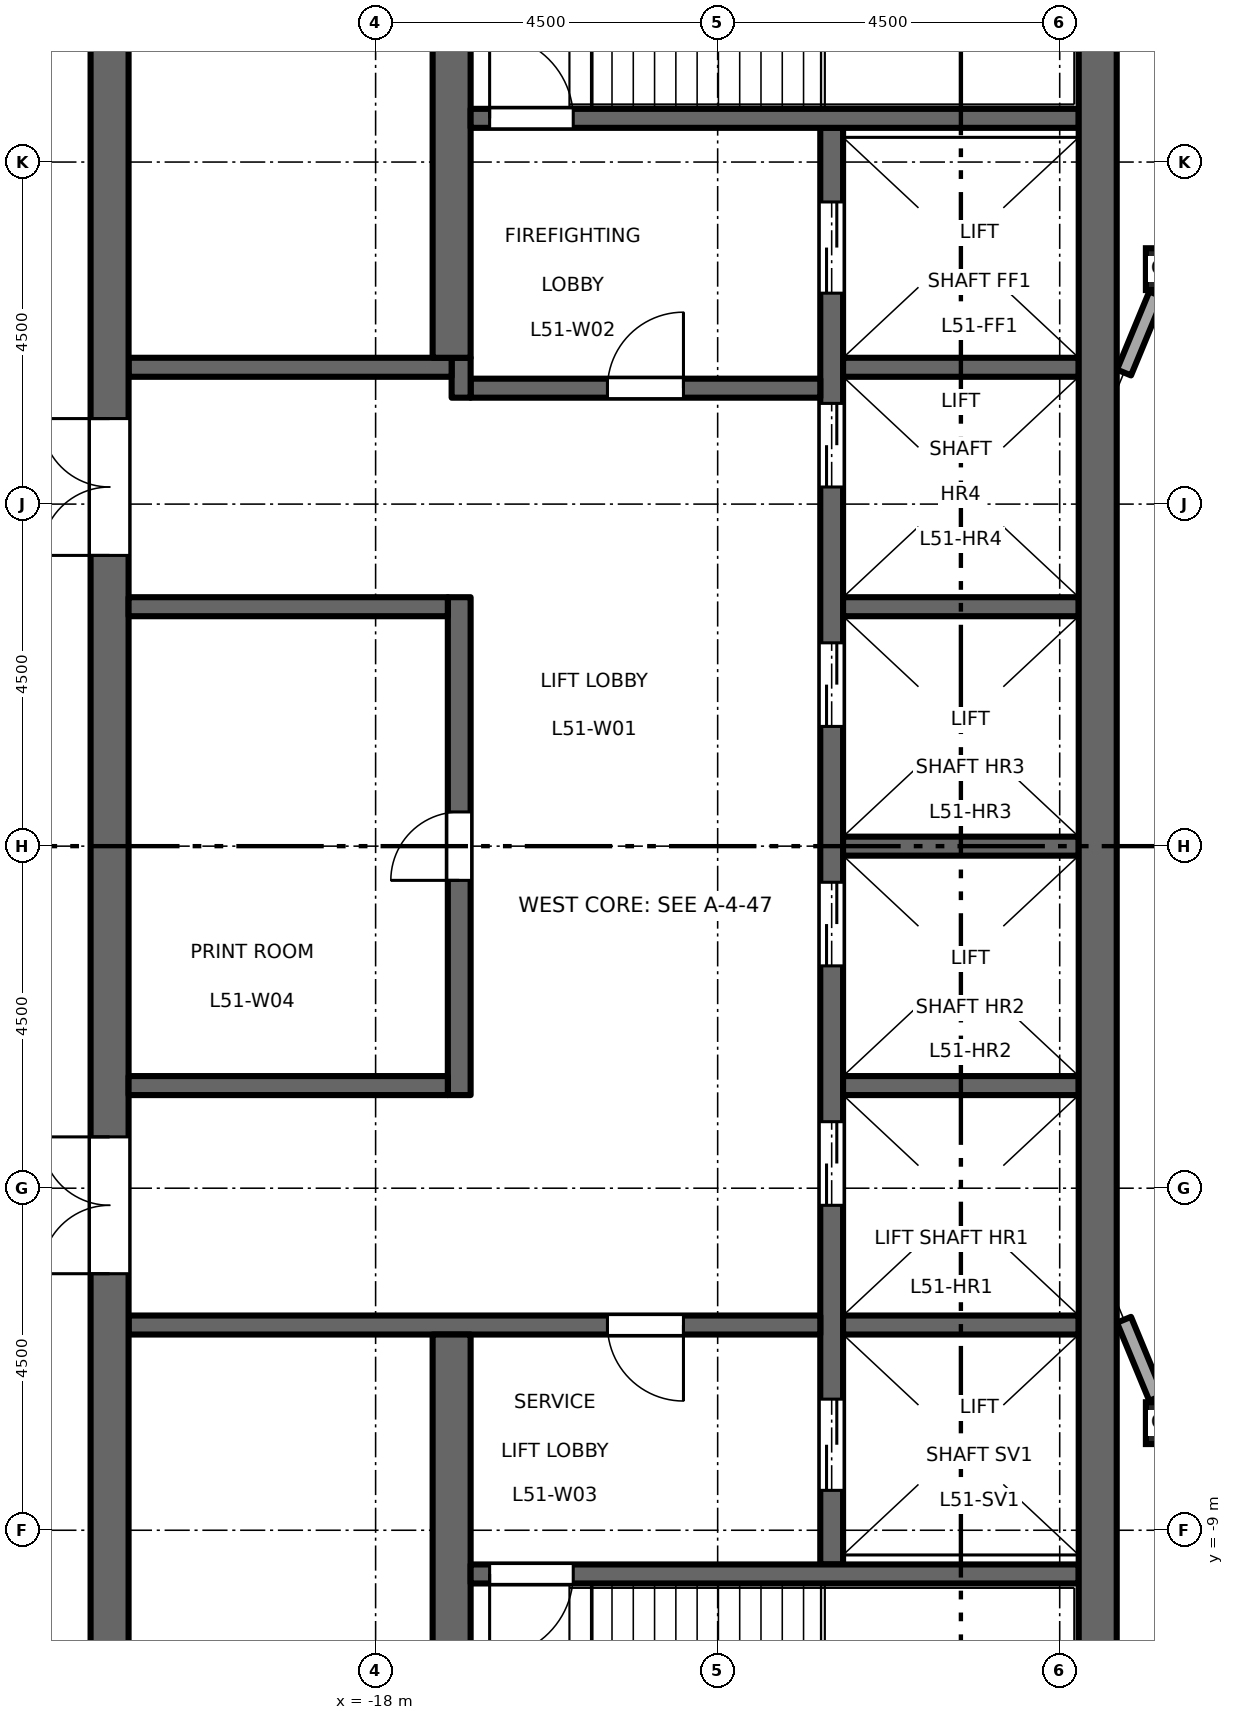
"""IFC4 building model, lengths in metres.
Left out: names, types, materials, properties, quantities, classifications, styles, units other than length and angle.
Written with IfcOpenShell. Run it as: python <this file> out.ifc"""

import sys

from ifc_helpers import new_model, si_unit, direction, frame, frame_2d, origin, origin_2d, place, context, subcontext, project, spatial, rectangle, hollow_rectangle, extrude, element, fill, save


model = new_model("IFC4")
c1 = context("Model", 3, precision=1e-05, world=origin(), true_north=direction((0.0, 1.0)))
c2 = subcontext(c1, "Body", "Model", "MODEL_VIEW")
j1 = project(units=[si_unit("LENGTHUNIT", "METRE"), si_unit("PLANEANGLEUNIT", "RADIAN")], contexts=[c1])
p1 = place(None, origin())
s1 = spatial("IfcSite", under=j1, at=p1, CompositionType="ELEMENT")
p2 = place(p1, origin())
s2 = spatial("IfcBuilding", under=s1, at=p2, CompositionType="ELEMENT")
p3 = place(p2, frame((0.0, 0.0, 237.7)))
s3 = spatial("IfcBuildingStorey", under=s2, at=p3, CompositionType="ELEMENT", Elevation=237.7)
for number, where, z_axis, x_axis in (
    (1, (-7.591, -7.591, 0.0), (0.0, 0.0, 1.0), (1.0, 0.0, 0.0)),
    (2, (-7.591, 7.591, 0.0), (0.0, 0.0, 1.0), (1.0, 0.0, 0.0)),
):
    element("IfcColumn", number, at=place(p3, frame(where, z_axis=z_axis, x_axis=x_axis)), inside=s3, PredefinedType="COLUMN", context=c2, shape_type="SweptSolid", body=[
        extrude(hollow_rectangle(XDim=0.55, YDim=0.55, WallThickness=0.028, at=origin_2d()), origin(), (0.0, 0.0, 1.0), 4.5),
    ])
p4 = place(p3, frame((-12.0, -9.45, 0.0), z_axis=(0.0, 0.0, 1.0), x_axis=(0.0, 1.0, 0.0)))
e3 = element("IfcWall", 3, at=p4, inside=s3, PredefinedType="SHEAR", context=c2, shape_type="SweptSolid", body=[
    extrude(rectangle(XDim=18.9, YDim=0.3, at=frame_2d((9.45, 0.0))), origin(), (0.0, 0.0, 1.0), 4.35),
])
p5 = place(p4, frame((4.725, 0.0, 0.0)))
e4 = element("IfcOpeningElement", 4, at=p5, cuts=e3, PredefinedType="OPENING", context=c2, shape_type="SweptSolid", body=[
    extrude(rectangle(XDim=1.1, YDim=2.1, at=frame_2d((0.55, 1.05))), frame((0.0, 0.16, 0.0), z_axis=(0.0, -1.0, 0.0), x_axis=(1.0, 0.0, 0.0)), (0.0, 0.0, 1.0), 0.32),
])
p6 = place(p4, frame((7.875, 0.0, 0.0)))
e5 = element("IfcOpeningElement", 5, at=p6, cuts=e3, PredefinedType="OPENING", context=c2, shape_type="SweptSolid", body=[
    extrude(rectangle(XDim=1.1, YDim=2.1, at=frame_2d((0.55, 1.05))), frame((0.0, 0.16, 0.0), z_axis=(0.0, -1.0, 0.0), x_axis=(1.0, 0.0, 0.0)), (0.0, 0.0, 1.0), 0.32),
])
p7 = place(p4, frame((11.025, 0.0, 0.0)))
e6 = element("IfcOpeningElement", 6, at=p7, cuts=e3, PredefinedType="OPENING", context=c2, shape_type="SweptSolid", body=[
    extrude(rectangle(XDim=1.1, YDim=2.1, at=frame_2d((0.55, 1.05))), frame((0.0, 0.16, 0.0), z_axis=(0.0, -1.0, 0.0), x_axis=(1.0, 0.0, 0.0)), (0.0, 0.0, 1.0), 0.32),
])
p8 = place(p4, frame((14.175, 0.0, 0.0)))
e7 = element("IfcOpeningElement", 7, at=p8, cuts=e3, PredefinedType="OPENING", context=c2, shape_type="SweptSolid", body=[
    extrude(rectangle(XDim=1.1, YDim=2.1, at=frame_2d((0.55, 1.05))), frame((0.0, 0.16, 0.0), z_axis=(0.0, -1.0, 0.0), x_axis=(1.0, 0.0, 0.0)), (0.0, 0.0, 1.0), 0.32),
])
p9 = place(p4, frame((16.725, 0.0, 0.0)))
e8 = element("IfcOpeningElement", 8, at=p9, cuts=e3, PredefinedType="OPENING", context=c2, shape_type="SweptSolid", body=[
    extrude(rectangle(XDim=1.2, YDim=2.1, at=frame_2d((0.6, 1.05))), frame((0.0, 0.16, 0.0), z_axis=(0.0, -1.0, 0.0), x_axis=(1.0, 0.0, 0.0)), (0.0, 0.0, 1.0), 0.32),
])
p10 = place(p4, frame((0.975, 0.0, 0.0)))
e9 = element("IfcOpeningElement", 9, at=p10, cuts=e3, PredefinedType="OPENING", context=c2, shape_type="SweptSolid", body=[
    extrude(rectangle(XDim=1.2, YDim=2.1, at=frame_2d((0.6, 1.05))), frame((0.0, 0.16, 0.0), z_axis=(0.0, -1.0, 0.0), x_axis=(1.0, 0.0, 0.0)), (0.0, 0.0, 1.0), 0.32),
])
p11 = place(p3, frame((-12.15, 6.025, 0.0), z_axis=(0.0, 0.0, 1.0), x_axis=(-1.0, 0.0, 0.0)))
e10 = element("IfcWall", 10, at=p11, inside=s3, PredefinedType="SHEAR", context=c2, shape_type="SweptSolid", body=[
    extrude(rectangle(XDim=4.6, YDim=0.25, at=frame_2d((2.3, 0.0))), origin(), (0.0, 0.0, 1.0), 4.35),
])
p12 = place(p11, frame((1.8, 0.0, 0.0)))
e11 = element("IfcOpeningElement", 11, at=p12, cuts=e10, PredefinedType="OPENING", context=c2, shape_type="SweptSolid", body=[
    extrude(rectangle(XDim=1.0, YDim=2.1, at=frame_2d((0.5, 1.05))), frame((0.0, 0.135, 0.0), z_axis=(0.0, -1.0, 0.0), x_axis=(1.0, 0.0, 0.0)), (0.0, 0.0, 1.0), 0.27),
])
p13 = place(p3, frame((-16.875, 5.9, 0.0), z_axis=(0.0, 0.0, 1.0), x_axis=(0.0, 1.0, 0.0)))
e12 = element("IfcWall", 12, at=p13, inside=s3, PredefinedType="SHEAR", context=c2, shape_type="SweptSolid", body=[
    extrude(rectangle(XDim=0.525, YDim=0.25, at=frame_2d((0.263, 0.0))), origin(), (0.0, 0.0, 1.0), 4.35),
])
p14 = place(p3, frame((-17.0, 6.3, 0.0), z_axis=(0.0, 0.0, 1.0), x_axis=(-1.0, 0.0, 0.0)))
e13 = element("IfcWall", 13, at=p14, inside=s3, PredefinedType="SHEAR", context=c2, shape_type="SweptSolid", body=[
    extrude(rectangle(XDim=4.25, YDim=0.25, at=frame_2d((2.125, 0.0))), origin(), (0.0, 0.0, 1.0), 4.35),
])
p15 = place(p3, frame((-12.15, -6.3, 0.0), z_axis=(0.0, 0.0, 1.0), x_axis=(-1.0, 0.0, 0.0)))
e14 = element("IfcWall", 14, at=p15, inside=s3, PredefinedType="SHEAR", context=c2, shape_type="SweptSolid", body=[
    extrude(rectangle(XDim=9.1, YDim=0.25, at=frame_2d((4.55, 0.0))), origin(), (0.0, 0.0, 1.0), 4.35),
])
p16 = place(p15, frame((1.8, 0.0, 0.0)))
e15 = element("IfcOpeningElement", 15, at=p16, cuts=e14, PredefinedType="OPENING", context=c2, shape_type="SweptSolid", body=[
    extrude(rectangle(XDim=1.0, YDim=2.1, at=frame_2d((0.5, 1.05))), frame((0.0, 0.135, 0.0), z_axis=(0.0, -1.0, 0.0), x_axis=(1.0, 0.0, 0.0)), (0.0, 0.0, 1.0), 0.27),
])
p17 = place(p3, frame((-21.5, -13.0, 0.0), z_axis=(0.0, 0.0, 1.0), x_axis=(0.0, 1.0, 0.0)))
e16 = element("IfcWall", 16, at=p17, inside=s3, PredefinedType="SHEAR", context=c2, shape_type="SweptSolid", body=[
    extrude(rectangle(XDim=26.0, YDim=0.5, at=frame_2d((13.0, 0.0))), origin(), (0.0, 0.0, 1.0), 4.35),
])
p18 = place(p17, frame((16.825, 0.0, 0.0)))
e17 = element("IfcOpeningElement", 17, at=p18, cuts=e16, PredefinedType="OPENING", context=c2, shape_type="SweptSolid", body=[
    extrude(rectangle(XDim=1.8, YDim=2.1, at=frame_2d((0.9, 1.05))), frame((0.0, 0.26, 0.0), z_axis=(0.0, -1.0, 0.0), x_axis=(1.0, 0.0, 0.0)), (0.0, 0.0, 1.0), 0.52),
])
p19 = place(p17, frame((7.375, 0.0, 0.0)))
e18 = element("IfcOpeningElement", 18, at=p19, cuts=e16, PredefinedType="OPENING", context=c2, shape_type="SweptSolid", body=[
    extrude(rectangle(XDim=1.8, YDim=2.1, at=frame_2d((0.9, 1.05))), frame((0.0, 0.26, 0.0), z_axis=(0.0, -1.0, 0.0), x_axis=(1.0, 0.0, 0.0)), (0.0, 0.0, 1.0), 0.52),
])
p20 = place(p3, frame((-16.9, -3.275, 0.0), z_axis=(0.0, 0.0, 1.0), x_axis=(0.0, 1.0, 0.0)))
e19 = element("IfcWall", 19, at=p20, inside=s3, PredefinedType="SHEAR", context=c2, shape_type="SweptSolid", body=[
    extrude(rectangle(XDim=6.55, YDim=0.3, at=frame_2d((3.275, 0.0))), origin(), (0.0, 0.0, 1.0), 4.35),
])
p21 = place(p20, frame((2.825, 0.0, 0.0)))
e20 = element("IfcOpeningElement", 20, at=p21, cuts=e19, PredefinedType="OPENING", context=c2, shape_type="SweptSolid", body=[
    extrude(rectangle(XDim=0.9, YDim=2.1, at=frame_2d((0.45, 1.05))), frame((0.0, 0.16, 0.0), z_axis=(0.0, -1.0, 0.0), x_axis=(1.0, 0.0, 0.0)), (0.0, 0.0, 1.0), 0.32),
])
for number, where, z_axis, x_axis in (
    (21, (-17.05, 3.15, 0.0), (0.0, 0.0, 1.0), (-1.0, 0.0, 0.0)),
    (22, (-17.05, -3.15, 0.0), (0.0, 0.0, 1.0), (-1.0, 0.0, 0.0)),
):
    element("IfcWall", number, at=place(p3, frame(where, z_axis=z_axis, x_axis=x_axis)), inside=s3, PredefinedType="SHEAR", context=c2, shape_type="SweptSolid", body=[
        extrude(rectangle(XDim=4.2, YDim=0.25, at=frame_2d((2.1, 0.0))), origin(), (0.0, 0.0, 1.0), 4.35),
    ])
for number, where, z_axis, x_axis in (
    (23, (-17.0, 6.425, 0.0), (0.0, 0.0, 1.0), (0.0, 1.0, 0.0)),
    (24, (-17.0, -13.0, 0.0), (0.0, 0.0, 1.0), (0.0, 1.0, 0.0)),
):
    element("IfcWall", number, at=place(p3, frame(where, z_axis=z_axis, x_axis=x_axis)), inside=s3, PredefinedType="SHEAR", context=c2, shape_type="SweptSolid", body=[
        extrude(rectangle(XDim=6.575, YDim=0.5, at=frame_2d((3.288, 0.0))), origin(), (0.0, 0.0, 1.0), 4.35),
    ])
for number, where, z_axis, x_axis in (
    (25, (-8.75, 0.0, 0.0), (0.0, 0.0, 1.0), (-1.0, 0.0, 0.0)),
    (26, (-8.75, 3.15, 0.0), (0.0, 0.0, 1.0), (-1.0, 0.0, 0.0)),
    (27, (-8.75, 6.3, 0.0), (0.0, 0.0, 1.0), (-1.0, 0.0, 0.0)),
    (28, (-8.75, -3.15, 0.0), (0.0, 0.0, 1.0), (-1.0, 0.0, 0.0)),
    (29, (-8.75, -6.3, 0.0), (0.0, 0.0, 1.0), (-1.0, 0.0, 0.0)),
):
    element("IfcWall", number, at=place(p3, frame(where, z_axis=z_axis, x_axis=x_axis)), inside=s3, PredefinedType="SHEAR", context=c2, shape_type="SweptSolid", body=[
        extrude(rectangle(XDim=3.1, YDim=0.25, at=frame_2d((1.55, 0.0))), origin(), (0.0, 0.0, 1.0), 4.35),
    ])
p22 = place(p3, frame((-8.75, 9.575, 0.0), z_axis=(0.0, 0.0, 1.0), x_axis=(-1.0, 0.0, 0.0)))
e30 = element("IfcWall", 30, at=p22, inside=s3, PredefinedType="SHEAR", context=c2, shape_type="SweptSolid", body=[
    extrude(rectangle(XDim=8.0, YDim=0.25, at=frame_2d((4.0, 0.0))), origin(), (0.0, 0.0, 1.0), 4.35),
])
p23 = place(p22, frame((6.65, 0.0, 0.0)))
e31 = element("IfcOpeningElement", 31, at=p23, cuts=e30, PredefinedType="OPENING", context=c2, shape_type="SweptSolid", body=[
    extrude(rectangle(XDim=1.1, YDim=2.1, at=frame_2d((0.55, 1.05))), frame((0.0, 0.135, 0.0), z_axis=(0.0, -1.0, 0.0), x_axis=(1.0, 0.0, 0.0)), (0.0, 0.0, 1.0), 0.27),
])
p24 = place(p3, frame((-8.75, -9.575, 0.0), z_axis=(0.0, 0.0, 1.0), x_axis=(-1.0, 0.0, 0.0)))
e32 = element("IfcWall", 32, at=p24, inside=s3, PredefinedType="SHEAR", context=c2, shape_type="SweptSolid", body=[
    extrude(rectangle(XDim=8.0, YDim=0.25, at=frame_2d((4.0, 0.0))), origin(), (0.0, 0.0, 1.0), 4.35),
])
p25 = place(p24, frame((6.65, 0.0, 0.0)))
e33 = element("IfcOpeningElement", 33, at=p25, cuts=e32, PredefinedType="OPENING", context=c2, shape_type="SweptSolid", body=[
    extrude(rectangle(XDim=1.1, YDim=2.1, at=frame_2d((0.55, 1.05))), frame((0.0, 0.135, 0.0), z_axis=(0.0, -1.0, 0.0), x_axis=(1.0, 0.0, 0.0)), (0.0, 0.0, 1.0), 0.27),
])
p26 = place(p3, frame((-8.5, -13.0, 0.0), z_axis=(0.0, 0.0, 1.0), x_axis=(0.0, 1.0, 0.0)))
e34 = element("IfcWall", 34, at=p26, inside=s3, PredefinedType="SHEAR", context=c2, shape_type="SweptSolid", body=[
    extrude(rectangle(XDim=26.0, YDim=0.5, at=frame_2d((13.0, 0.0))), origin(), (0.0, 0.0, 1.0), 4.35),
])
for number, where, z_axis, x_axis in (
    (35, (-7.729, 7.259, 0.0), (0.0, 0.0, 1.0), (-0.383, -0.924, 0.0)),
    (36, (-8.154, -6.231, 0.0), (0.0, 0.0, 1.0), (0.383, -0.924, 0.0)),
):
    element("IfcWall", number, at=place(p3, frame(where, z_axis=z_axis, x_axis=x_axis)), inside=s3, PredefinedType="STANDARD", context=c2, shape_type="SweptSolid", body=[
        extrude(rectangle(XDim=1.113, YDim=0.2, at=frame_2d((0.556, 0.0))), origin(), (0.0, 0.0, 1.0), 3.918),
    ])
p27 = place(p12, origin())
e37 = element("IfcDoor", 37, at=p27, inside=s3, OperationType="SINGLE_SWING_LEFT", PredefinedType="DOOR", context=c2, shape_type="SweptSolid", body=[
    extrude(rectangle(XDim=1.0, YDim=2.1, at=frame_2d((0.5, 1.05))), frame((0.0, 0.025, 0.0), z_axis=(0.0, -1.0, 0.0), x_axis=(1.0, 0.0, 0.0)), (0.0, 0.0, 1.0), 0.05),
])
fill(e11, e37)
p28 = place(p16, origin())
e38 = element("IfcDoor", 38, at=p28, inside=s3, OperationType="SINGLE_SWING_RIGHT", PredefinedType="DOOR", context=c2, shape_type="SweptSolid", body=[
    extrude(rectangle(XDim=1.0, YDim=2.1, at=frame_2d((0.5, 1.05))), frame((0.0, 0.025, 0.0), z_axis=(0.0, -1.0, 0.0), x_axis=(1.0, 0.0, 0.0)), (0.0, 0.0, 1.0), 0.05),
])
fill(e15, e38)
p29 = place(p23, origin())
e39 = element("IfcDoor", 39, at=p29, inside=s3, OperationType="SINGLE_SWING_RIGHT", PredefinedType="DOOR", context=c2, shape_type="SweptSolid", body=[
    extrude(rectangle(XDim=1.1, YDim=2.1, at=frame_2d((0.55, 1.05))), frame((0.0, 0.025, 0.0), z_axis=(0.0, -1.0, 0.0), x_axis=(1.0, 0.0, 0.0)), (0.0, 0.0, 1.0), 0.05),
])
fill(e31, e39)
p30 = place(p25, origin())
e40 = element("IfcDoor", 40, at=p30, inside=s3, OperationType="SINGLE_SWING_LEFT", PredefinedType="DOOR", context=c2, shape_type="SweptSolid", body=[
    extrude(rectangle(XDim=1.1, YDim=2.1, at=frame_2d((0.55, 1.05))), frame((0.0, 0.025, 0.0), z_axis=(0.0, -1.0, 0.0), x_axis=(1.0, 0.0, 0.0)), (0.0, 0.0, 1.0), 0.05),
])
fill(e33, e40)
p31 = place(p18, origin())
e41 = element("IfcDoor", 41, at=p31, inside=s3, OperationType="DOUBLE_DOOR_DOUBLE_SWING", PredefinedType="DOOR", context=c2, shape_type="SweptSolid", body=[
    extrude(rectangle(XDim=1.8, YDim=2.1, at=frame_2d((0.9, 1.05))), frame((0.0, 0.025, 0.0), z_axis=(0.0, -1.0, 0.0), x_axis=(1.0, 0.0, 0.0)), (0.0, 0.0, 1.0), 0.05),
])
fill(e17, e41)
p32 = place(p19, origin())
e42 = element("IfcDoor", 42, at=p32, inside=s3, OperationType="DOUBLE_DOOR_DOUBLE_SWING", PredefinedType="DOOR", context=c2, shape_type="SweptSolid", body=[
    extrude(rectangle(XDim=1.8, YDim=2.1, at=frame_2d((0.9, 1.05))), frame((0.0, 0.025, 0.0), z_axis=(0.0, -1.0, 0.0), x_axis=(1.0, 0.0, 0.0)), (0.0, 0.0, 1.0), 0.05),
])
fill(e18, e42)
p33 = place(p5, origin())
e43 = element("IfcDoor", 43, at=p33, inside=s3, OperationType="DOUBLE_DOOR_SLIDING", PredefinedType="DOOR", context=c2, shape_type="SweptSolid", body=[
    extrude(rectangle(XDim=1.1, YDim=2.1, at=frame_2d((0.55, 1.05))), frame((0.0, 0.025, 0.0), z_axis=(0.0, -1.0, 0.0), x_axis=(1.0, 0.0, 0.0)), (0.0, 0.0, 1.0), 0.05),
])
fill(e4, e43)
p34 = place(p6, origin())
e44 = element("IfcDoor", 44, at=p34, inside=s3, OperationType="DOUBLE_DOOR_SLIDING", PredefinedType="DOOR", context=c2, shape_type="SweptSolid", body=[
    extrude(rectangle(XDim=1.1, YDim=2.1, at=frame_2d((0.55, 1.05))), frame((0.0, 0.025, 0.0), z_axis=(0.0, -1.0, 0.0), x_axis=(1.0, 0.0, 0.0)), (0.0, 0.0, 1.0), 0.05),
])
fill(e5, e44)
p35 = place(p7, origin())
e45 = element("IfcDoor", 45, at=p35, inside=s3, OperationType="DOUBLE_DOOR_SLIDING", PredefinedType="DOOR", context=c2, shape_type="SweptSolid", body=[
    extrude(rectangle(XDim=1.1, YDim=2.1, at=frame_2d((0.55, 1.05))), frame((0.0, 0.025, 0.0), z_axis=(0.0, -1.0, 0.0), x_axis=(1.0, 0.0, 0.0)), (0.0, 0.0, 1.0), 0.05),
])
fill(e6, e45)
p36 = place(p8, origin())
e46 = element("IfcDoor", 46, at=p36, inside=s3, OperationType="DOUBLE_DOOR_SLIDING", PredefinedType="DOOR", context=c2, shape_type="SweptSolid", body=[
    extrude(rectangle(XDim=1.1, YDim=2.1, at=frame_2d((0.55, 1.05))), frame((0.0, 0.025, 0.0), z_axis=(0.0, -1.0, 0.0), x_axis=(1.0, 0.0, 0.0)), (0.0, 0.0, 1.0), 0.05),
])
fill(e7, e46)
p37 = place(p9, origin())
e47 = element("IfcDoor", 47, at=p37, inside=s3, OperationType="DOUBLE_DOOR_SLIDING", PredefinedType="DOOR", context=c2, shape_type="SweptSolid", body=[
    extrude(rectangle(XDim=1.2, YDim=2.1, at=frame_2d((0.6, 1.05))), frame((0.0, 0.025, 0.0), z_axis=(0.0, -1.0, 0.0), x_axis=(1.0, 0.0, 0.0)), (0.0, 0.0, 1.0), 0.05),
])
fill(e8, e47)
p38 = place(p10, origin())
e48 = element("IfcDoor", 48, at=p38, inside=s3, OperationType="DOUBLE_DOOR_SLIDING", PredefinedType="DOOR", context=c2, shape_type="SweptSolid", body=[
    extrude(rectangle(XDim=1.2, YDim=2.1, at=frame_2d((0.6, 1.05))), frame((0.0, 0.025, 0.0), z_axis=(0.0, -1.0, 0.0), x_axis=(1.0, 0.0, 0.0)), (0.0, 0.0, 1.0), 0.05),
])
fill(e9, e48)
p39 = place(p21, origin())
e49 = element("IfcDoor", 49, at=p39, inside=s3, OperationType="SINGLE_SWING_RIGHT", PredefinedType="DOOR", context=c2, shape_type="SweptSolid", body=[
    extrude(rectangle(XDim=0.9, YDim=2.1, at=frame_2d((0.45, 1.05))), frame((0.0, 0.025, 0.0), z_axis=(0.0, -1.0, 0.0), x_axis=(1.0, 0.0, 0.0)), (0.0, 0.0, 1.0), 0.05),
])
fill(e20, e49)
save(model, sys.argv[1])
